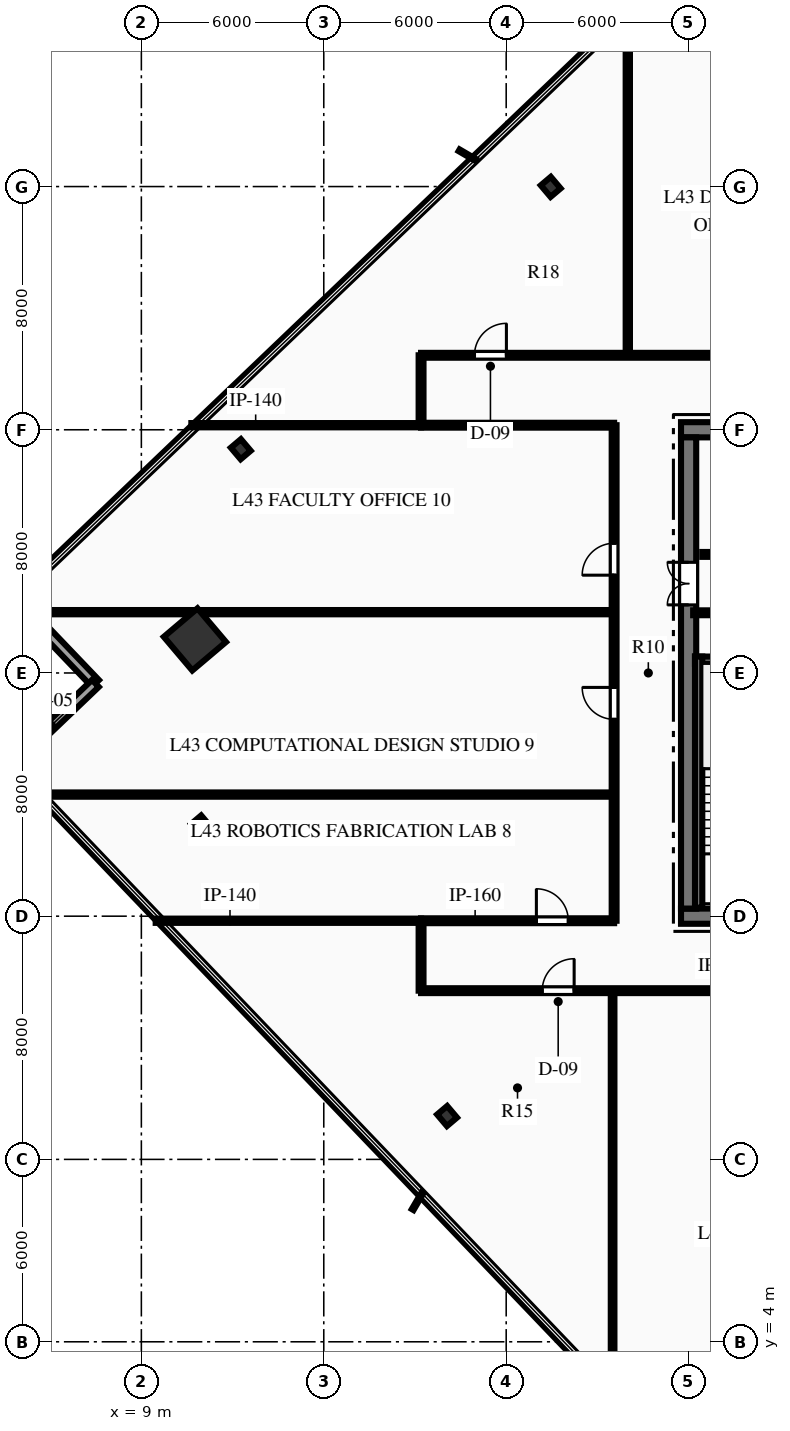
"""IFC4 building model, lengths in metres.
Left out: names, types, materials, properties, quantities, classifications, styles, units other than length and angle.
Written with IfcOpenShell. Run it as: python <this file> out.ifc"""

import sys

from ifc_helpers import new_model, si_unit, direction, frame, frame_2d, origin, origin_2d, place, context, subcontext, project, spatial, rectangle, hollow_rectangle, i_section, extrude, element, fill, save


model = new_model("IFC4")
c1 = context("Model", 3, precision=1e-05, world=origin(), true_north=direction((0.0, 1.0)))
c2 = subcontext(c1, "Body", "Model", "MODEL_VIEW")
j1 = project(units=[si_unit("LENGTHUNIT", "METRE"), si_unit("PLANEANGLEUNIT", "RADIAN")], contexts=[c1])
p1 = place(None, origin())
s1 = spatial("IfcSite", under=j1, at=p1, CompositionType="ELEMENT")
p2 = place(p1, origin())
s2 = spatial("IfcBuilding", under=s1, at=p2, CompositionType="ELEMENT")
p3 = place(p2, frame((0.0, 0.0, 174.45)))
s3 = spatial("IfcBuildingStorey", under=s2, at=p3, CompositionType="ELEMENT", Elevation=174.45)
p4 = place(p3, frame((26.75, 18.0, 0.0), z_axis=(0.0, 0.0, 1.0), x_axis=(1.0, 0.0, 0.0)))
e1 = element("IfcWall", 1, at=p4, inside=s3, PredefinedType="SHEAR", context=c2, shape_type="SweptSolid", body=[
    extrude(rectangle(XDim=18.5, YDim=0.5, at=frame_2d((9.25, 0.0))), origin(), (0.0, 0.0, 1.0), 3.75),
])
p5 = place(p4, frame((7.35, 0.0, 0.0)))
e2 = element("IfcOpeningElement", 2, at=p5, cuts=e1, PredefinedType="OPENING", context=c2, shape_type="SweptSolid", body=[
    extrude(rectangle(XDim=1.1, YDim=2.15, at=frame_2d((0.55, 1.075))), frame((0.0, 0.26, 0.0), z_axis=(0.0, -1.0, 0.0), x_axis=(1.0, 0.0, 0.0)), (0.0, 0.0, 1.0), 0.52),
])
p6 = place(p4, frame((10.05, 0.0, 0.0)))
e3 = element("IfcOpeningElement", 3, at=p6, cuts=e1, PredefinedType="OPENING", context=c2, shape_type="SweptSolid", body=[
    extrude(rectangle(XDim=1.1, YDim=2.15, at=frame_2d((0.55, 1.075))), frame((0.0, 0.26, 0.0), z_axis=(0.0, -1.0, 0.0), x_axis=(1.0, 0.0, 0.0)), (0.0, 0.0, 1.0), 0.52),
])
p7 = place(p3, frame((26.75, 34.0, 0.0), z_axis=(0.0, 0.0, 1.0), x_axis=(1.0, 0.0, 0.0)))
e4 = element("IfcWall", 4, at=p7, inside=s3, PredefinedType="SHEAR", context=c2, shape_type="SweptSolid", body=[
    extrude(rectangle(XDim=18.5, YDim=0.5, at=frame_2d((9.25, 0.0))), origin(), (0.0, 0.0, 1.0), 3.75),
])
p8 = place(p7, frame((13.935, 0.0, 0.0)))
e5 = element("IfcOpeningElement", 5, at=p8, cuts=e4, PredefinedType="OPENING", context=c2, shape_type="SweptSolid", body=[
    extrude(rectangle(XDim=1.1, YDim=2.15, at=frame_2d((0.55, 1.075))), frame((0.0, 0.26, 0.0), z_axis=(0.0, -1.0, 0.0), x_axis=(1.0, 0.0, 0.0)), (0.0, 0.0, 1.0), 0.52),
])
p9 = place(p7, frame((16.185, 0.0, 0.0)))
e6 = element("IfcOpeningElement", 6, at=p9, cuts=e4, PredefinedType="OPENING", context=c2, shape_type="SweptSolid", body=[
    extrude(rectangle(XDim=1.1, YDim=2.15, at=frame_2d((0.55, 1.075))), frame((0.0, 0.26, 0.0), z_axis=(0.0, -1.0, 0.0), x_axis=(1.0, 0.0, 0.0)), (0.0, 0.0, 1.0), 0.52),
])
p10 = place(p3, frame((27.0, 18.25, 0.0), z_axis=(0.0, 0.0, 1.0), x_axis=(0.0, 1.0, 0.0)))
e7 = element("IfcWall", 7, at=p10, inside=s3, PredefinedType="SHEAR", context=c2, shape_type="SweptSolid", body=[
    extrude(rectangle(XDim=15.5, YDim=0.5, at=frame_2d((7.75, 0.0))), origin(), (0.0, 0.0, 1.0), 3.75),
])
p11 = place(p10, frame((9.99, 0.0, 0.0)))
e8 = element("IfcOpeningElement", 8, at=p11, cuts=e7, PredefinedType="OPENING", context=c2, shape_type="SweptSolid", body=[
    extrude(rectangle(XDim=1.4, YDim=2.2, at=frame_2d((0.7, 1.1))), frame((0.0, 0.26, 0.0), z_axis=(0.0, -1.0, 0.0), x_axis=(1.0, 0.0, 0.0)), (0.0, 0.0, 1.0), 0.52),
])
p12 = place(p3, frame((27.21, 26.42, 0.0), z_axis=(0.0, 0.0, 1.0), x_axis=(1.0, 0.0, 0.0)))
e9 = element("IfcWall", 9, at=p12, inside=s3, PredefinedType="SHEAR", context=c2, shape_type="SweptSolid", body=[
    extrude(rectangle(XDim=3.98, YDim=0.24, at=frame_2d((1.99, 0.0))), origin(), (0.0, 0.0, 1.0), 3.75),
])
p13 = place(p3, frame((27.33, 18.28, 0.0), z_axis=(0.0, 0.0, 1.0), x_axis=(0.0, 1.0, 0.0)))
e10 = element("IfcWall", 10, at=p13, inside=s3, PredefinedType="SHEAR", context=c2, shape_type="SweptSolid", body=[
    extrude(rectangle(XDim=8.26, YDim=0.24, at=frame_2d((4.13, 0.0))), origin(), (0.0, 0.0, 1.0), 3.75),
])
p14 = place(p3, frame((10.761, 27.104, 0.0), z_axis=(0.0, 0.0, 1.0), x_axis=(0.763232469783, 0.646123979643, 0.0)))
e11 = element("IfcColumn", 11, at=p14, inside=s3, PredefinedType="COLUMN", context=c2, shape_type="SweptSolid", body=[
    extrude(hollow_rectangle(XDim=1.45, YDim=1.45, WallThickness=0.07, at=origin_2d()), origin(), (0.0, 0.0, 1.0), 3.75),
])
for number, where, z_axis, x_axis in (
    (12, (22.464, 41.99, 0.0), (0.0, 0.0, 1.0), (0.763, 0.646, 0.0)),
    (13, (12.27, 33.36, 0.0), (0.0, 0.0, 1.0), (0.763, 0.646, 0.0)),
    (14, (10.963, 20.983, 0.0), (0.0, 0.0, 1.0), (0.763, 0.646, 0.0)),
    (15, (19.055, 11.426, 0.0), (0.0, 0.0, 1.0), (0.763, 0.646, 0.0)),
):
    element("IfcColumn", number, at=place(p3, frame(where, z_axis=z_axis, x_axis=x_axis)), inside=s3, PredefinedType="COLUMN", context=c2, shape_type="SweptSolid", body=[
        extrude(i_section(OverallWidth=0.432, OverallDepth=0.498, WebThickness=0.056, FlangeThickness=0.089, at=origin_2d()), origin(), (0.0, 0.0, 1.0), 3.75),
    ])
p15 = place(p3, frame((7.489, 25.657, 0.0), z_axis=(0.0, 0.0, 1.0), x_axis=(-0.690903852793, 0.722946655153, 0.0)))
e16 = element("IfcWall", 16, at=p15, inside=s3, PredefinedType="STANDARD", context=c2, shape_type="SweptSolid", body=[
    extrude(rectangle(XDim=4.0, YDim=0.32, at=frame_2d((2.0, 0.0))), origin(), (0.0, 0.0, 1.0), 3.46),
])
p16 = place(p3, frame((4.597, 22.893, 0.0), z_axis=(0.0, 0.0, 1.0), x_axis=(0.722977141356, 0.690871951288, 0.0)))
e17 = element("IfcWall", 17, at=p16, inside=s3, PredefinedType="STANDARD", context=c2, shape_type="SweptSolid", body=[
    extrude(rectangle(XDim=4.0, YDim=0.32, at=frame_2d((2.0, 0.0))), origin(), (0.0, 0.0, 1.0), 3.46),
])
p17 = place(p16, frame((1.275, 0.0, 0.85)))
e18 = element("IfcOpeningElement", 18, at=p17, cuts=e17, PredefinedType="OPENING", context=c2, shape_type="SweptSolid", body=[
    extrude(rectangle(XDim=1.45, YDim=2.05, at=frame_2d((0.725, 1.025))), frame((0.0, 0.17, 0.0), z_axis=(0.0, -1.0, 0.0), x_axis=(1.0, 0.0, 0.0)), (0.0, 0.0, 1.0), 0.34),
])
p18 = place(p3, frame((27.15, 27.98, 0.0), z_axis=(0.0, 0.0, 1.0), x_axis=(1.0, 0.0, 0.0)))
e19 = element("IfcWall", 19, at=p18, inside=s3, PredefinedType="PARTITIONING", context=c2, shape_type="SweptSolid", body=[
    extrude(rectangle(XDim=4.05, YDim=0.16, at=frame_2d((2.025, 0.0))), origin(), (0.0, 0.0, 1.0), 3.46),
])
p19 = place(p18, frame((1.625, 0.0, 0.0)))
e20 = element("IfcOpeningElement", 20, at=p19, cuts=e19, PredefinedType="OPENING", context=c2, shape_type="SweptSolid", body=[
    extrude(rectangle(XDim=0.95, YDim=2.15, at=frame_2d((0.475, 1.075))), frame((0.0, 0.09, 0.0), z_axis=(0.0, -1.0, 0.0), x_axis=(1.0, 0.0, 0.0)), (0.0, 0.0, 1.0), 0.18),
])
p20 = place(p3, frame((27.45, 29.9, 0.0), z_axis=(0.0, 0.0, 1.0), x_axis=(1.0, 0.0, 0.0)))
e21 = element("IfcWall", 21, at=p20, inside=s3, PredefinedType="PARTITIONING", context=c2, shape_type="SweptSolid", body=[
    extrude(rectangle(XDim=4.43, YDim=0.16, at=frame_2d((2.215, 0.0))), origin(), (0.0, 0.0, 1.0), 3.46),
])
p21 = place(p20, frame((1.675, 0.0, 0.0)))
e22 = element("IfcOpeningElement", 22, at=p21, cuts=e21, PredefinedType="OPENING", context=c2, shape_type="SweptSolid", body=[
    extrude(rectangle(XDim=0.95, YDim=2.15, at=frame_2d((0.475, 1.075))), frame((0.0, 0.09, 0.0), z_axis=(0.0, -1.0, 0.0), x_axis=(1.0, 0.0, 0.0)), (0.0, 0.0, 1.0), 0.18),
])
p22 = place(p3, frame((18.2, 15.55, 0.0), z_axis=(0.0, 0.0, 1.0), x_axis=(1.0, 0.0, 0.0)))
e23 = element("IfcWall", 23, at=p22, inside=s3, PredefinedType="PARTITIONING", context=c2, shape_type="SweptSolid", body=[
    extrude(rectangle(XDim=35.6, YDim=0.16, at=frame_2d((17.8, 0.0))), origin(), (0.0, 0.0, 1.0), 3.46),
])
p23 = place(p22, frame((3.985, 0.0, 0.0)))
e24 = element("IfcOpeningElement", 24, at=p23, cuts=e23, PredefinedType="OPENING", context=c2, shape_type="SweptSolid", body=[
    extrude(rectangle(XDim=1.05, YDim=2.15, at=frame_2d((0.525, 1.075))), frame((0.0, 0.09, 0.0), z_axis=(0.0, -1.0, 0.0), x_axis=(1.0, 0.0, 0.0)), (0.0, 0.0, 1.0), 0.18),
])
p24 = place(p22, frame((16.775, 0.0, 0.0)))
e25 = element("IfcOpeningElement", 25, at=p24, cuts=e23, PredefinedType="OPENING", context=c2, shape_type="SweptSolid", body=[
    extrude(rectangle(XDim=1.05, YDim=2.15, at=frame_2d((0.525, 1.075))), frame((0.0, 0.09, 0.0), z_axis=(0.0, -1.0, 0.0), x_axis=(1.0, 0.0, 0.0)), (0.0, 0.0, 1.0), 0.18),
])
p25 = place(p22, frame((24.055, 0.0, 0.0)))
e26 = element("IfcOpeningElement", 26, at=p25, cuts=e23, PredefinedType="OPENING", context=c2, shape_type="SweptSolid", body=[
    extrude(rectangle(XDim=1.05, YDim=2.15, at=frame_2d((0.525, 1.075))), frame((0.0, 0.09, 0.0), z_axis=(0.0, -1.0, 0.0), x_axis=(1.0, 0.0, 0.0)), (0.0, 0.0, 1.0), 0.18),
])
p26 = place(p22, frame((33.113, 0.0, 0.0)))
e27 = element("IfcOpeningElement", 27, at=p26, cuts=e23, PredefinedType="OPENING", context=c2, shape_type="SweptSolid", body=[
    extrude(rectangle(XDim=1.05, YDim=2.15, at=frame_2d((0.525, 1.075))), frame((0.0, 0.09, 0.0), z_axis=(0.0, -1.0, 0.0), x_axis=(1.0, 0.0, 0.0)), (0.0, 0.0, 1.0), 0.18),
])
p27 = place(p3, frame((18.2, 17.85, 0.0), z_axis=(0.0, 0.0, 1.0), x_axis=(1.0, 0.0, 0.0)))
e28 = element("IfcWall", 28, at=p27, inside=s3, PredefinedType="PARTITIONING", context=c2, shape_type="SweptSolid", body=[
    extrude(rectangle(XDim=6.35, YDim=0.16, at=frame_2d((3.175, 0.0))), origin(), (0.0, 0.0, 1.0), 3.46),
])
p28 = place(p27, frame((3.793, 0.0, 0.0)))
e29 = element("IfcOpeningElement", 29, at=p28, cuts=e28, PredefinedType="OPENING", context=c2, shape_type="SweptSolid", body=[
    extrude(rectangle(XDim=1.05, YDim=2.15, at=frame_2d((0.525, 1.075))), frame((0.0, 0.09, 0.0), z_axis=(0.0, -1.0, 0.0), x_axis=(1.0, 0.0, 0.0)), (0.0, 0.0, 1.0), 0.18),
])
p29 = place(p3, frame((18.2, 36.45, 0.0), z_axis=(0.0, 0.0, 1.0), x_axis=(1.0, 0.0, 0.0)))
e30 = element("IfcWall", 30, at=p29, inside=s3, PredefinedType="PARTITIONING", context=c2, shape_type="SweptSolid", body=[
    extrude(rectangle(XDim=35.6, YDim=0.16, at=frame_2d((17.8, 0.0))), origin(), (0.0, 0.0, 1.0), 3.46),
])
p30 = place(p29, frame((20.05, 0.0, 0.0)))
e31 = element("IfcOpeningElement", 31, at=p30, cuts=e30, PredefinedType="OPENING", context=c2, shape_type="SweptSolid", body=[
    extrude(rectangle(XDim=0.9, YDim=2.15, at=frame_2d((0.45, 1.075))), frame((0.0, 0.09, 0.0), z_axis=(0.0, -1.0, 0.0), x_axis=(1.0, 0.0, 0.0)), (0.0, 0.0, 1.0), 0.18),
])
p31 = place(p29, frame((22.35, 0.0, 0.0)))
e32 = element("IfcOpeningElement", 32, at=p31, cuts=e30, PredefinedType="OPENING", context=c2, shape_type="SweptSolid", body=[
    extrude(rectangle(XDim=0.9, YDim=2.15, at=frame_2d((0.45, 1.075))), frame((0.0, 0.09, 0.0), z_axis=(0.0, -1.0, 0.0), x_axis=(1.0, 0.0, 0.0)), (0.0, 0.0, 1.0), 0.18),
])
p32 = place(p29, frame((24.6, 0.0, 0.0)))
e33 = element("IfcOpeningElement", 33, at=p32, cuts=e30, PredefinedType="OPENING", context=c2, shape_type="SweptSolid", body=[
    extrude(rectangle(XDim=1.0, YDim=2.15, at=frame_2d((0.5, 1.075))), frame((0.0, 0.09, 0.0), z_axis=(0.0, -1.0, 0.0), x_axis=(1.0, 0.0, 0.0)), (0.0, 0.0, 1.0), 0.18),
])
p33 = place(p29, frame((1.757, 0.0, 0.0)))
e34 = element("IfcOpeningElement", 34, at=p33, cuts=e30, PredefinedType="OPENING", context=c2, shape_type="SweptSolid", body=[
    extrude(rectangle(XDim=1.05, YDim=2.15, at=frame_2d((0.525, 1.075))), frame((0.0, 0.09, 0.0), z_axis=(0.0, -1.0, 0.0), x_axis=(1.0, 0.0, 0.0)), (0.0, 0.0, 1.0), 0.18),
])
p34 = place(p29, frame((11.155, 0.0, 0.0)))
e35 = element("IfcOpeningElement", 35, at=p34, cuts=e30, PredefinedType="OPENING", context=c2, shape_type="SweptSolid", body=[
    extrude(rectangle(XDim=1.05, YDim=2.15, at=frame_2d((0.525, 1.075))), frame((0.0, 0.09, 0.0), z_axis=(0.0, -1.0, 0.0), x_axis=(1.0, 0.0, 0.0)), (0.0, 0.0, 1.0), 0.18),
])
p35 = place(p29, frame((28.505, 0.0, 0.0)))
e36 = element("IfcOpeningElement", 36, at=p35, cuts=e30, PredefinedType="OPENING", context=c2, shape_type="SweptSolid", body=[
    extrude(rectangle(XDim=1.05, YDim=2.15, at=frame_2d((0.525, 1.075))), frame((0.0, 0.09, 0.0), z_axis=(0.0, -1.0, 0.0), x_axis=(1.0, 0.0, 0.0)), (0.0, 0.0, 1.0), 0.18),
])
p36 = place(p3, frame((18.2, 34.15, 0.0), z_axis=(0.0, 0.0, 1.0), x_axis=(1.0, 0.0, 0.0)))
e37 = element("IfcWall", 37, at=p36, inside=s3, PredefinedType="PARTITIONING", context=c2, shape_type="SweptSolid", body=[
    extrude(rectangle(XDim=6.35, YDim=0.16, at=frame_2d((3.175, 0.0))), origin(), (0.0, 0.0, 1.0), 3.46),
])
p37 = place(p3, frame((24.55, 17.85, 0.0), z_axis=(0.0, 0.0, 1.0), x_axis=(0.0, 1.0, 0.0)))
e38 = element("IfcWall", 38, at=p37, inside=s3, PredefinedType="PARTITIONING", context=c2, shape_type="SweptSolid", body=[
    extrude(rectangle(XDim=16.3, YDim=0.16, at=frame_2d((8.15, 0.0))), origin(), (0.0, 0.0, 1.0), 3.46),
])
p38 = place(p37, frame((6.625, 0.0, 0.0)))
e39 = element("IfcOpeningElement", 39, at=p38, cuts=e38, PredefinedType="OPENING", context=c2, shape_type="SweptSolid", body=[
    extrude(rectangle(XDim=1.05, YDim=2.15, at=frame_2d((0.525, 1.075))), frame((0.0, 0.09, 0.0), z_axis=(0.0, -1.0, 0.0), x_axis=(1.0, 0.0, 0.0)), (0.0, 0.0, 1.0), 0.18),
])
p39 = place(p37, frame((11.367, 0.0, 0.0)))
e40 = element("IfcOpeningElement", 40, at=p39, cuts=e38, PredefinedType="OPENING", context=c2, shape_type="SweptSolid", body=[
    extrude(rectangle(XDim=1.05, YDim=2.15, at=frame_2d((0.525, 1.075))), frame((0.0, 0.09, 0.0), z_axis=(0.0, -1.0, 0.0), x_axis=(1.0, 0.0, 0.0)), (0.0, 0.0, 1.0), 0.18),
])
for number, where, z_axis, x_axis in (
    (41, (18.2, 15.55, 0.0), (0.0, 0.0, 1.0), (0.0, 1.0, 0.0)),
    (42, (18.2, 34.15, 0.0), (0.0, 0.0, 1.0), (0.0, 1.0, 0.0)),
):
    element("IfcWall", number, at=place(p3, frame(where, z_axis=z_axis, x_axis=x_axis)), inside=s3, PredefinedType="PARTITIONING", context=c2, shape_type="SweptSolid", body=[
        extrude(rectangle(XDim=2.3, YDim=0.16, at=frame_2d((1.15, 0.0))), origin(), (0.0, 0.0, 1.0), 3.46),
    ])
p40 = place(p3, frame((9.471, 17.85, 0.0), z_axis=(0.0, 0.0, 1.0), x_axis=(1.0, 0.0, 0.0)))
e43 = element("IfcWall", 43, at=p40, inside=s3, PredefinedType="PARTITIONING", context=c2, shape_type="SweptSolid", body=[
    extrude(rectangle(XDim=8.729, YDim=0.14, at=frame_2d((4.364, 0.0))), origin(), (0.0, 0.0, 1.0), 3.46),
])
p41 = place(p3, frame((10.644, 34.15, 0.0), z_axis=(0.0, 0.0, 1.0), x_axis=(1.0, 0.0, 0.0)))
e44 = element("IfcWall", 44, at=p41, inside=s3, PredefinedType="PARTITIONING", context=c2, shape_type="SweptSolid", body=[
    extrude(rectangle(XDim=7.556, YDim=0.14, at=frame_2d((3.778, 0.0))), origin(), (0.0, 0.0, 1.0), 3.46),
])
p42 = place(p3, frame((24.5, 2.123, 0.0), z_axis=(0.0, 0.0, 1.0), x_axis=(0.0, 1.0, 0.0)))
e45 = element("IfcWall", 45, at=p42, inside=s3, PredefinedType="PARTITIONING", context=c2, shape_type="SweptSolid", body=[
    extrude(rectangle(XDim=13.427, YDim=0.12, at=frame_2d((6.713, 0.0))), origin(), (0.0, 0.0, 1.0), 3.46),
])
p43 = place(p3, frame((25.0, 36.45, 0.0), z_axis=(0.0, 0.0, 1.0), x_axis=(0.0, 1.0, 0.0)))
e46 = element("IfcWall", 46, at=p43, inside=s3, PredefinedType="PARTITIONING", context=c2, shape_type="SweptSolid", body=[
    extrude(rectangle(XDim=11.419, YDim=0.14, at=frame_2d((5.709, 0.0))), origin(), (0.0, 0.0, 1.0), 3.46),
])
p44 = place(p3, frame((5.506, 22.0, 0.0), z_axis=(0.0, 0.0, 1.0), x_axis=(1.0, 0.0, 0.0)))
e47 = element("IfcWall", 47, at=p44, inside=s3, PredefinedType="PARTITIONING", context=c2, shape_type="SweptSolid", body=[
    extrude(rectangle(XDim=19.044, YDim=0.14, at=frame_2d((9.522, 0.0))), origin(), (0.0, 0.0, 1.0), 3.46),
])
p45 = place(p3, frame((5.305, 28.0, 0.0), z_axis=(0.0, 0.0, 1.0), x_axis=(1.0, 0.0, 0.0)))
e48 = element("IfcWall", 48, at=p45, inside=s3, PredefinedType="PARTITIONING", context=c2, shape_type="SweptSolid", body=[
    extrude(rectangle(XDim=19.245, YDim=0.14, at=frame_2d((9.623, 0.0))), origin(), (0.0, 0.0, 1.0), 3.46),
])
p46 = place(p17, origin())
e49 = element("IfcWindow", 49, at=p46, inside=s3, PartitioningType="SINGLE_PANEL", PredefinedType="WINDOW", context=c2, shape_type="SweptSolid", body=[
    extrude(rectangle(XDim=1.45, YDim=2.05, at=frame_2d((0.725, 1.025))), frame((0.0, 0.03, 0.0), z_axis=(0.0, -1.0, 0.0), x_axis=(1.0, 0.0, 0.0)), (0.0, 0.0, 1.0), 0.06),
])
fill(e18, e49)
p47 = place(p11, origin())
e50 = element("IfcDoor", 50, at=p47, inside=s3, OperationType="DOUBLE_DOOR_SINGLE_SWING", PredefinedType="DOOR", context=c2, shape_type="SweptSolid", body=[
    extrude(rectangle(XDim=1.4, YDim=2.2, at=frame_2d((0.7, 1.1))), frame((0.0, 0.025, 0.0), z_axis=(0.0, -1.0, 0.0), x_axis=(1.0, 0.0, 0.0)), (0.0, 0.0, 1.0), 0.05),
])
fill(e8, e50)
p48 = place(p23, origin())
e51 = element("IfcDoor", 51, at=p48, inside=s3, OperationType="SINGLE_SWING_RIGHT", PredefinedType="DOOR", context=c2, shape_type="SweptSolid", body=[
    extrude(rectangle(XDim=1.05, YDim=2.15, at=frame_2d((0.525, 1.075))), frame((0.0, 0.025, 0.0), z_axis=(0.0, -1.0, 0.0), x_axis=(1.0, 0.0, 0.0)), (0.0, 0.0, 1.0), 0.05),
])
fill(e24, e51)
p49 = place(p33, origin())
e52 = element("IfcDoor", 52, at=p49, inside=s3, OperationType="SINGLE_SWING_RIGHT", PredefinedType="DOOR", context=c2, shape_type="SweptSolid", body=[
    extrude(rectangle(XDim=1.05, YDim=2.15, at=frame_2d((0.525, 1.075))), frame((0.0, 0.025, 0.0), z_axis=(0.0, -1.0, 0.0), x_axis=(1.0, 0.0, 0.0)), (0.0, 0.0, 1.0), 0.05),
])
fill(e34, e52)
p50 = place(p28, origin())
e53 = element("IfcDoor", 53, at=p50, inside=s3, OperationType="SINGLE_SWING_LEFT", PredefinedType="DOOR", context=c2, shape_type="SweptSolid", body=[
    extrude(rectangle(XDim=1.05, YDim=2.15, at=frame_2d((0.525, 1.075))), frame((0.0, 0.025, 0.0), z_axis=(0.0, -1.0, 0.0), x_axis=(1.0, 0.0, 0.0)), (0.0, 0.0, 1.0), 0.05),
])
fill(e29, e53)
p51 = place(p38, origin())
e54 = element("IfcDoor", 54, at=p51, inside=s3, OperationType="SINGLE_SWING_RIGHT", PredefinedType="DOOR", context=c2, shape_type="SweptSolid", body=[
    extrude(rectangle(XDim=1.05, YDim=2.15, at=frame_2d((0.525, 1.075))), frame((0.0, 0.025, 0.0), z_axis=(0.0, -1.0, 0.0), x_axis=(1.0, 0.0, 0.0)), (0.0, 0.0, 1.0), 0.05),
])
fill(e39, e54)
p52 = place(p39, origin())
e55 = element("IfcDoor", 55, at=p52, inside=s3, OperationType="SINGLE_SWING_LEFT", PredefinedType="DOOR", context=c2, shape_type="SweptSolid", body=[
    extrude(rectangle(XDim=1.05, YDim=2.15, at=frame_2d((0.525, 1.075))), frame((0.0, 0.025, 0.0), z_axis=(0.0, -1.0, 0.0), x_axis=(1.0, 0.0, 0.0)), (0.0, 0.0, 1.0), 0.05),
])
fill(e40, e55)
save(model, sys.argv[1])
